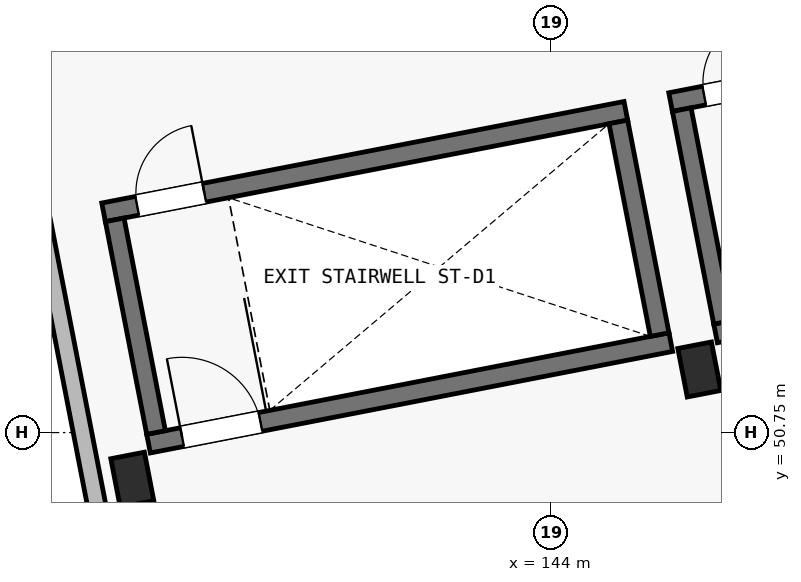
"""IFC4 building model, lengths in metres.
Left out: names, types, materials, properties, quantities, classifications, styles, units other than length and angle.
Written with IfcOpenShell. Run it as: python <this file> out.ifc"""

import sys

from ifc_helpers import new_model, si_unit, direction, frame, frame_2d, origin, origin_2d, place, context, subcontext, project, spatial, rectangle, extrude, element, fill, save


model = new_model("IFC4")
c1 = context("Model", 3, precision=1e-05, world=origin(), true_north=direction((0.0, 1.0)))
c2 = subcontext(c1, "Body", "Model", "MODEL_VIEW")
j1 = project(units=[si_unit("LENGTHUNIT", "METRE"), si_unit("PLANEANGLEUNIT", "RADIAN")], contexts=[c1])
p1 = place(None, origin())
s1 = spatial("IfcSite", under=j1, at=p1, CompositionType="ELEMENT")
p2 = place(p1, origin())
s2 = spatial("IfcBuilding", under=s1, at=p2, CompositionType="ELEMENT")
p3 = place(p2, frame((0.0, 0.0, 27.9)))
s3 = spatial("IfcBuildingStorey", under=s2, at=p3, CompositionType="ELEMENT", Elevation=27.9)
p4 = place(p3, frame((138.491, 50.13, 0.0), z_axis=(0.0, 0.0, 1.0), x_axis=(0.981627183448, 0.190808995377, 0.0)))
e1 = element("IfcColumn", 1, at=p4, inside=s3, PredefinedType="COLUMN", context=c2, shape_type="SweptSolid", body=[
    extrude(rectangle(XDim=0.45, YDim=0.65, at=origin_2d()), origin(), (0.0, 0.0, 1.0), 3.0),
])
p5 = place(p3, frame((145.952, 51.58, 0.0), z_axis=(0.0, 0.0, 1.0), x_axis=(0.981627183448, 0.190808995377, 0.0)))
e2 = element("IfcColumn", 2, at=p5, inside=s3, PredefinedType="COLUMN", context=c2, shape_type="SweptSolid", body=[
    extrude(rectangle(XDim=0.45, YDim=0.65, at=origin_2d()), origin(), (0.0, 0.0, 1.0), 3.25),
])
p6 = place(p3, frame((138.113, 53.647, 0.0), z_axis=(0.0, 0.0, 1.0), x_axis=(0.981626097708, 0.19081458094, 0.0)))
e3 = element("IfcWall", 3, at=p6, inside=s3, PredefinedType="SHEAR", context=c2, shape_type="SweptSolid", body=[
    extrude(rectangle(XDim=7.0, YDim=0.25, at=frame_2d((3.5, 0.0))), origin(), (0.0, 0.0, 1.0), 3.049),
])
p7 = place(p6, frame((0.45, 0.0, 0.0)))
e4 = element("IfcOpeningElement", 4, at=p7, cuts=e3, PredefinedType="OPENING", context=c2, shape_type="SweptSolid", body=[
    extrude(rectangle(XDim=0.9, YDim=2.1, at=frame_2d((0.45, 1.05))), frame((0.0, 0.14, 0.0), z_axis=(0.0, -1.0, 0.0), x_axis=(1.0, 0.0, 0.0)), (0.0, 0.0, 1.0), 0.28),
])
p8 = place(p3, frame((138.705, 50.604, 0.0), z_axis=(0.0, 0.0, 1.0), x_axis=(0.981626097708, 0.19081458094, 0.0)))
e5 = element("IfcWall", 5, at=p8, inside=s3, PredefinedType="SHEAR", context=c2, shape_type="SweptSolid", body=[
    extrude(rectangle(XDim=7.0, YDim=0.25, at=frame_2d((3.5, 0.0))), origin(), (0.0, 0.0, 1.0), 3.049),
])
p9 = place(p8, frame((0.45, 0.0, 0.0)))
e6 = element("IfcOpeningElement", 6, at=p9, cuts=e5, PredefinedType="OPENING", context=c2, shape_type="SweptSolid", body=[
    extrude(rectangle(XDim=1.05, YDim=2.15, at=frame_2d((0.525, 1.075))), frame((0.0, 0.14, 0.0), z_axis=(0.0, -1.0, 0.0), x_axis=(1.0, 0.0, 0.0)), (0.0, 0.0, 1.0), 0.28),
])
p10 = place(p3, frame((138.804, 50.751, 0.0), z_axis=(0.0, 0.0, 1.0), x_axis=(-0.190858194834, 0.981617618762, 0.0)))
e7 = element("IfcWall", 7, at=p10, inside=s3, PredefinedType="SHEAR", context=c2, shape_type="SweptSolid", body=[
    extrude(rectangle(XDim=2.85, YDim=0.25, at=frame_2d((1.425, 0.0))), origin(), (0.0, 0.0, 1.0), 3.049),
])
p11 = place(p3, frame((145.43, 52.039, 0.0), z_axis=(0.0, 0.0, 1.0), x_axis=(-0.190842147128, 0.981620738819, 0.0)))
e8 = element("IfcWall", 8, at=p11, inside=s3, PredefinedType="SHEAR", context=c2, shape_type="SweptSolid", body=[
    extrude(rectangle(XDim=2.85, YDim=0.25, at=frame_2d((1.425, 0.0))), origin(), (0.0, 0.0, 1.0), 3.049),
])
p12 = place(p3, frame((145.574, 55.098, 0.0), z_axis=(0.0, 0.0, 1.0), x_axis=(0.981626097708, 0.19081458094, 0.0)))
e9 = element("IfcWall", 9, at=p12, inside=s3, PredefinedType="SHEAR", context=c2, shape_type="SweptSolid", body=[
    extrude(rectangle(XDim=7.0, YDim=0.25, at=frame_2d((3.5, 0.0))), origin(), (0.0, 0.0, 1.0), 3.25),
])
p13 = place(p12, frame((0.45, 0.0, 0.0)))
e10 = element("IfcOpeningElement", 10, at=p13, cuts=e9, PredefinedType="OPENING", context=c2, shape_type="SweptSolid", body=[
    extrude(rectangle(XDim=0.9, YDim=2.1, at=frame_2d((0.45, 1.05))), frame((0.0, 0.14, 0.0), z_axis=(0.0, -1.0, 0.0), x_axis=(1.0, 0.0, 0.0)), (0.0, 0.0, 1.0), 0.28),
])
p14 = place(p3, frame((146.165, 52.054, 0.0), z_axis=(0.0, 0.0, 1.0), x_axis=(0.981627367538, 0.190808048312, 0.0)))
e11 = element("IfcWall", 11, at=p14, inside=s3, PredefinedType="SHEAR", context=c2, shape_type="SweptSolid", body=[
    extrude(rectangle(XDim=7.0, YDim=0.25, at=frame_2d((3.5, 0.0))), origin(), (0.0, 0.0, 1.0), 3.25),
])
p15 = place(p14, frame((0.45, 0.0, 0.0)))
e12 = element("IfcOpeningElement", 12, at=p15, cuts=e11, PredefinedType="OPENING", context=c2, shape_type="SweptSolid", body=[
    extrude(rectangle(XDim=1.05, YDim=2.15, at=frame_2d((0.525, 1.075))), frame((0.0, 0.14, 0.0), z_axis=(0.0, -1.0, 0.0), x_axis=(1.0, 0.0, 0.0)), (0.0, 0.0, 1.0), 0.28),
])
p16 = place(p3, frame((146.264, 52.201, 0.0), z_axis=(0.0, 0.0, 1.0), x_axis=(-0.190775649797, 0.981633664584, 0.0)))
e13 = element("IfcWall", 13, at=p16, inside=s3, PredefinedType="SHEAR", context=c2, shape_type="SweptSolid", body=[
    extrude(rectangle(XDim=2.85, YDim=0.25, at=frame_2d((1.425, 0.0))), origin(), (0.0, 0.0, 1.0), 3.25),
])
p17 = place(p3, frame((140.366, 37.735, 0.0), z_axis=(0.0, 0.0, 1.0), x_axis=(-0.190806686307, 0.981627632282, 0.0)))
e14 = element("IfcWall", 14, at=p17, inside=s3, PredefinedType="SOLIDWALL", context=c2, shape_type="SweptSolid", body=[
    extrude(rectangle(XDim=20.65, YDim=0.24, at=frame_2d((10.325, 0.0))), origin(), (0.0, 0.0, 1.0), 3.305),
])
p18 = place(p17, frame((2.45, 0.0, 0.45)))
e15 = element("IfcOpeningElement", 15, at=p18, cuts=e14, PredefinedType="OPENING", context=c2, shape_type="SweptSolid", body=[
    extrude(rectangle(XDim=0.68, YDim=2.24, at=frame_2d((0.34, 1.12))), frame((0.0, 0.135, 0.0), z_axis=(0.0, -1.0, 0.0), x_axis=(1.0, 0.0, 0.0)), (0.0, 0.0, 1.0), 0.27),
])
p19 = place(p17, frame((17.38, 0.0, 0.52)))
e16 = element("IfcOpeningElement", 16, at=p19, cuts=e14, PredefinedType="OPENING", context=c2, shape_type="SweptSolid", body=[
    extrude(rectangle(XDim=0.82, YDim=2.18, at=frame_2d((0.41, 1.09))), frame((0.0, 0.135, 0.0), z_axis=(0.0, -1.0, 0.0), x_axis=(1.0, 0.0, 0.0)), (0.0, 0.0, 1.0), 0.27),
])
p20 = place(p9, origin())
e17 = element("IfcDoor", 17, at=p20, inside=s3, OperationType="SINGLE_SWING_LEFT", PredefinedType="DOOR", context=c2, shape_type="SweptSolid", body=[
    extrude(rectangle(XDim=1.05, YDim=2.15, at=frame_2d((0.525, 1.075))), frame((0.0, 0.025, 0.0), z_axis=(0.0, -1.0, 0.0), x_axis=(1.0, 0.0, 0.0)), (0.0, 0.0, 1.0), 0.05),
])
fill(e6, e17)
p21 = place(p7, origin())
e18 = element("IfcDoor", 18, at=p21, inside=s3, OperationType="SINGLE_SWING_RIGHT", PredefinedType="DOOR", context=c2, shape_type="SweptSolid", body=[
    extrude(rectangle(XDim=0.9, YDim=2.1, at=frame_2d((0.45, 1.05))), frame((0.0, 0.025, 0.0), z_axis=(0.0, -1.0, 0.0), x_axis=(1.0, 0.0, 0.0)), (0.0, 0.0, 1.0), 0.05),
])
fill(e4, e18)
p22 = place(p13, origin())
e19 = element("IfcDoor", 19, at=p22, inside=s3, OperationType="SINGLE_SWING_RIGHT", PredefinedType="DOOR", context=c2, shape_type="SweptSolid", body=[
    extrude(rectangle(XDim=0.9, YDim=2.1, at=frame_2d((0.45, 1.05))), frame((0.0, 0.025, 0.0), z_axis=(0.0, -1.0, 0.0), x_axis=(1.0, 0.0, 0.0)), (0.0, 0.0, 1.0), 0.05),
])
fill(e10, e19)
save(model, sys.argv[1])
